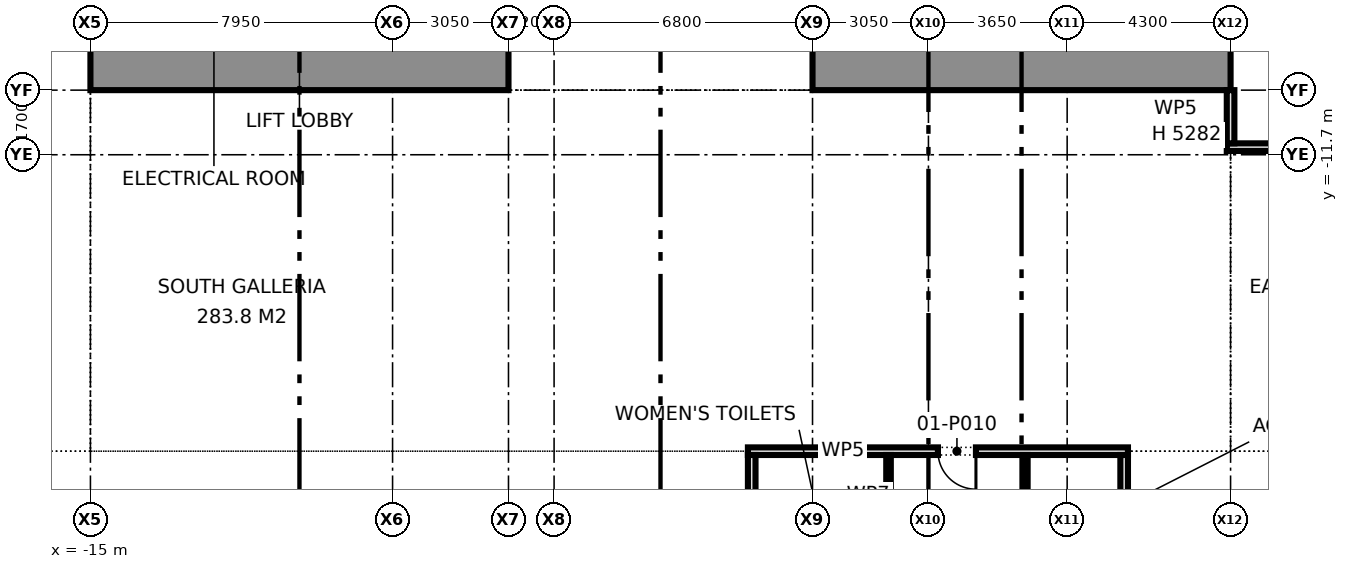
"""IFC4 building model, lengths in metres.
Left out: names, types, materials, properties, quantities, classifications, styles, units other than length and angle.
Written with IfcOpenShell. Run it as: python <this file> out.ifc"""

import sys

from ifc_helpers import new_model, si_unit, direction, frame, frame_2d, origin, place, context, subcontext, project, spatial, rectangle, extrude, element, fill, save


model = new_model("IFC4")
c1 = context("Model", 3, precision=1e-05, world=origin(), true_north=direction((0.0, 1.0)))
c2 = subcontext(c1, "Body", "Model", "MODEL_VIEW")
j1 = project(units=[si_unit("LENGTHUNIT", "METRE"), si_unit("PLANEANGLEUNIT", "RADIAN")], contexts=[c1])
p1 = place(None, origin())
s1 = spatial("IfcSite", under=j1, at=p1, CompositionType="ELEMENT")
p2 = place(p1, origin())
s2 = spatial("IfcBuilding", under=s1, at=p2, CompositionType="ELEMENT")
p3 = place(p2, origin())
s3 = spatial("IfcBuildingStorey", under=s2, at=p3, CompositionType="ELEMENT", Elevation=0.0)
for number, where, z_axis, x_axis in (
    (1, (-15.0, -9.45, 0.0), (0.0, 0.0, 1.0), (1.0, 0.0, 0.0)),
    (2, (15.0, -9.45, 0.0), (0.0, 0.0, 1.0), (-1.0, 0.0, 0.0)),
):
    element("IfcWall", number, at=place(p3, frame(where, z_axis=z_axis, x_axis=x_axis)), inside=s3, PredefinedType="SHEAR", context=c2, shape_type="SweptSolid", body=[
        extrude(rectangle(XDim=11.0, YDim=1.1, at=frame_2d((5.5, 0.0))), origin(), (0.0, 0.0, 1.0), 6.275),
    ])
p4 = place(p3, frame((2.3, -19.5, 0.0), z_axis=(0.0, 0.0, 1.0), x_axis=(1.0, 0.0, 0.0)))
e3 = element("IfcWall", 3, at=p4, inside=s3, PredefinedType="PARTITIONING", context=c2, shape_type="SweptSolid", body=[
    extrude(rectangle(XDim=10.0, YDim=0.2, at=frame_2d((5.0, 0.0))), origin(), (0.0, 0.0, 1.0), 6.275),
])
p5 = place(p4, frame((5.0, 0.0, 0.0)))
e4 = element("IfcOpeningElement", 4, at=p5, cuts=e3, PredefinedType="OPENING", context=c2, shape_type="SweptSolid", body=[
    extrude(rectangle(XDim=1.0, YDim=2.1, at=frame_2d((0.5, 1.05))), frame((0.0, 0.11, 0.0), z_axis=(0.0, -1.0, 0.0), x_axis=(1.0, 0.0, 0.0)), (0.0, 0.0, 1.0), 0.22),
])
p6 = place(p3, frame((14.9, -11.5, 0.0), z_axis=(0.0, 0.0, 1.0), x_axis=(1.0, 0.0, 0.0)))
e5 = element("IfcWall", 5, at=p6, inside=s3, PredefinedType="PARTITIONING", context=c2, shape_type="SweptSolid", body=[
    extrude(rectangle(XDim=4.7, YDim=0.2, at=frame_2d((2.35, 0.0))), origin(), (0.0, 0.0, 1.0), 6.275),
])
p7 = place(p3, frame((15.0, -11.4, 0.0), z_axis=(0.0, 0.0, 1.0), x_axis=(0.0, 1.0, 0.0)))
e6 = element("IfcWall", 6, at=p7, inside=s3, PredefinedType="PARTITIONING", context=c2, shape_type="SweptSolid", body=[
    extrude(rectangle(XDim=1.4, YDim=0.2, at=frame_2d((0.7, 0.0))), origin(), (0.0, 0.0, 1.0), 5.282),
])
p8 = place(p3, frame((12.2, -23.6, 0.0), z_axis=(0.0, 0.0, 1.0), x_axis=(0.0, 1.0, 0.0)))
e7 = element("IfcWall", 7, at=p8, inside=s3, PredefinedType="PARTITIONING", context=c2, shape_type="SweptSolid", body=[
    extrude(rectangle(XDim=4.0, YDim=0.2, at=frame_2d((2.0, 0.0))), origin(), (0.0, 0.0, 1.0), 5.348),
])
p9 = place(p8, frame((1.5, 0.0, 0.0)))
e8 = element("IfcOpeningElement", 8, at=p9, cuts=e7, PredefinedType="OPENING", context=c2, shape_type="SweptSolid", body=[
    extrude(rectangle(XDim=1.0, YDim=2.1, at=frame_2d((0.5, 1.05))), frame((0.0, 0.11, 0.0), z_axis=(0.0, -1.0, 0.0), x_axis=(1.0, 0.0, 0.0)), (0.0, 0.0, 1.0), 0.22),
])
p10 = place(p3, frame((2.4, -23.6, 0.0), z_axis=(0.0, 0.0, 1.0), x_axis=(0.0, 1.0, 0.0)))
e9 = element("IfcWall", 9, at=p10, inside=s3, PredefinedType="PARTITIONING", context=c2, shape_type="SweptSolid", body=[
    extrude(rectangle(XDim=4.0, YDim=0.2, at=frame_2d((2.0, 0.0))), origin(), (0.0, 0.0, 1.0), 6.275),
])
p11 = place(p10, frame((1.5, 0.0, 0.0)))
e10 = element("IfcOpeningElement", 10, at=p11, cuts=e9, PredefinedType="OPENING", context=c2, shape_type="SweptSolid", body=[
    extrude(rectangle(XDim=1.0, YDim=2.1, at=frame_2d((0.5, 1.05))), frame((0.0, 0.11, 0.0), z_axis=(0.0, -1.0, 0.0), x_axis=(1.0, 0.0, 0.0)), (0.0, 0.0, 1.0), 0.22),
])
p12 = place(p3, frame((9.6, -23.6, 0.0), z_axis=(0.0, 0.0, 1.0), x_axis=(0.0, 1.0, 0.0)))
e11 = element("IfcWall", 11, at=p12, inside=s3, PredefinedType="PARTITIONING", context=c2, shape_type="SweptSolid", body=[
    extrude(rectangle(XDim=4.0, YDim=0.12, at=frame_2d((2.0, 0.0))), origin(), (0.0, 0.0, 1.0), 6.275),
])
p13 = place(p3, frame((6.0, -23.6, 0.0), z_axis=(0.0, 0.0, 1.0), x_axis=(0.0, 1.0, 0.0)))
e12 = element("IfcWall", 12, at=p13, inside=s3, PredefinedType="PARTITIONING", context=c2, shape_type="SweptSolid", body=[
    extrude(rectangle(XDim=4.0, YDim=0.12, at=frame_2d((2.0, 0.0))), origin(), (0.0, 0.0, 1.0), 5.348),
])
p14 = place(p5, frame((1.0, 0.0, 0.0), z_axis=(0.0, 0.0, 1.0), x_axis=(-1.0, 0.0, 0.0)))
e13 = element("IfcDoor", 13, at=p14, inside=s3, OperationType="SINGLE_SWING_LEFT", PredefinedType="DOOR", context=c2, shape_type="SweptSolid", body=[
    extrude(rectangle(XDim=1.0, YDim=2.1, at=frame_2d((0.5, 1.05))), frame((0.0, 0.025, 0.0), z_axis=(0.0, -1.0, 0.0), x_axis=(1.0, 0.0, 0.0)), (0.0, 0.0, 1.0), 0.05),
])
fill(e4, e13)
save(model, sys.argv[1])
